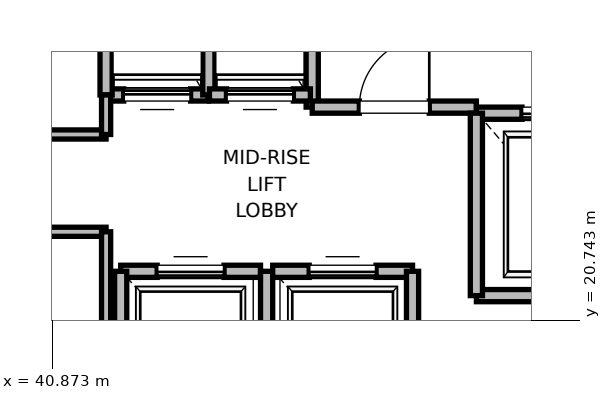
"""IFC4 building model, lengths in metres.
Left out: names, types, materials, properties, quantities, classifications, styles, units other than length and angle.
Written with IfcOpenShell. Run it as: python <this file> out.ifc"""

import sys

from ifc_helpers import new_model, si_unit, direction, frame, frame_2d, origin, place, context, subcontext, project, spatial, rectangle, extrude, element, fill, save


model = new_model("IFC4")
c1 = context("Model", 3, precision=1e-05, world=origin(), true_north=direction((0.0, 1.0)))
c2 = subcontext(c1, "Body", "Model", "MODEL_VIEW")
j1 = project(units=[si_unit("LENGTHUNIT", "METRE"), si_unit("PLANEANGLEUNIT", "RADIAN")], contexts=[c1])
p1 = place(None, origin())
s1 = spatial("IfcSite", under=j1, at=p1, CompositionType="ELEMENT")
p2 = place(p1, origin())
s2 = spatial("IfcBuilding", under=s1, at=p2, CompositionType="ELEMENT")
p3 = place(p2, frame((0.0, 0.0, 148.4)))
s3 = spatial("IfcBuildingStorey", under=s2, at=p3, CompositionType="ELEMENT", Elevation=148.4)
p4 = place(p3, frame((45.15, 24.25, 0.0), z_axis=(0.0, 0.0, 1.0), x_axis=(0.0, 1.0, 0.0)))
e1 = element("IfcWall", 1, at=p4, inside=s3, PredefinedType="PARTITIONING", context=c2, shape_type="SweptSolid", body=[
    extrude(rectangle(XDim=3.37, YDim=0.2, at=frame_2d((1.685, 0.0))), origin(), (0.0, 0.0, 1.0), 3.775),
])
p5 = place(p3, frame((45.15, 24.25, 0.0), z_axis=(0.0, 0.0, 1.0), x_axis=(1.0, 0.0, 0.0)))
e2 = element("IfcWall", 2, at=p5, inside=s3, PredefinedType="PARTITIONING", context=c2, shape_type="SweptSolid", body=[
    extrude(rectangle(XDim=2.7, YDim=0.2, at=frame_2d((1.35, 0.0))), origin(), (0.0, 0.0, 1.0), 3.775),
])
p6 = place(p5, frame((0.775, 0.0, 0.0)))
e3 = element("IfcOpeningElement", 3, at=p6, cuts=e2, PredefinedType="OPENING", context=c2, shape_type="SweptSolid", body=[
    extrude(rectangle(XDim=1.15, YDim=2.2, at=frame_2d((0.575, 1.1))), frame((0.0, 0.1, 0.0), z_axis=(0.0, -1.0, 0.0), x_axis=(1.0, 0.0, 0.0)), (0.0, 0.0, 1.0), 0.2),
])
p7 = place(p3, frame((47.85, 21.15, 0.0), z_axis=(0.0, 0.0, 1.0), x_axis=(1.0, 0.0, 0.0)))
e4 = element("IfcWall", 4, at=p7, inside=s3, PredefinedType="SOLIDWALL", context=c2, shape_type="SweptSolid", body=[
    extrude(rectangle(XDim=2.6, YDim=0.2, at=frame_2d((1.3, 0.0))), origin(), (0.0, 0.0, 1.0), 3.775),
])
p8 = place(p3, frame((50.45, 24.15, 0.0), z_axis=(0.0, 0.0, 1.0), x_axis=(-1.0, 0.0, 0.0)))
e5 = element("IfcWall", 5, at=p8, inside=s3, PredefinedType="SOLIDWALL", context=c2, shape_type="SweptSolid", body=[
    extrude(rectangle(XDim=2.6, YDim=0.2, at=frame_2d((1.3, 0.0))), origin(), (0.0, 0.0, 1.0), 2.755),
])
p9 = place(p8, frame((0.75, 0.0, 0.0)))
e6 = element("IfcOpeningElement", 6, at=p9, cuts=e5, PredefinedType="OPENING", context=c2, shape_type="SweptSolid", body=[
    extrude(rectangle(XDim=1.1, YDim=2.2, at=frame_2d((0.55, 1.1))), frame((0.0, 0.1, 0.0), z_axis=(0.0, -1.0, 0.0), x_axis=(1.0, 0.0, 0.0)), (0.0, 0.0, 1.0), 0.2),
])
p10 = place(p3, frame((47.85, 24.15, 0.0), z_axis=(0.0, 0.0, 1.0), x_axis=(0.0, -1.0, 0.0)))
e7 = element("IfcWall", 7, at=p10, inside=s3, PredefinedType="SOLIDWALL", context=c2, shape_type="SweptSolid", body=[
    extrude(rectangle(XDim=3.0, YDim=0.2, at=frame_2d((1.5, 0.0))), origin(), (0.0, 0.0, 1.0), 3.775),
])
p11 = place(p3, frame((44.3, 21.55, 0.0), z_axis=(0.0, 0.0, 1.0), x_axis=(-1.0, 0.0, 0.0)))
e8 = element("IfcWall", 8, at=p11, inside=s3, PredefinedType="SOLIDWALL", context=c2, shape_type="SweptSolid", body=[
    extrude(rectangle(XDim=2.3, YDim=0.2, at=frame_2d((1.15, 0.0))), origin(), (0.0, 0.0, 1.0), 3.775),
])
p12 = place(p11, frame((0.6, 0.0, 0.0)))
e9 = element("IfcOpeningElement", 9, at=p12, cuts=e8, PredefinedType="OPENING", context=c2, shape_type="SweptSolid", body=[
    extrude(rectangle(XDim=1.1, YDim=2.2, at=frame_2d((0.55, 1.1))), frame((0.0, 0.1, 0.0), z_axis=(0.0, -1.0, 0.0), x_axis=(1.0, 0.0, 0.0)), (0.0, 0.0, 1.0), 0.2),
])
p13 = place(p3, frame((42.0, 21.55, 0.0), z_axis=(0.0, 0.0, 1.0), x_axis=(0.0, -1.0, 0.0)))
e10 = element("IfcWall", 10, at=p13, inside=s3, PredefinedType="SOLIDWALL", context=c2, shape_type="SweptSolid", body=[
    extrude(rectangle(XDim=2.6, YDim=0.2, at=frame_2d((1.3, 0.0))), origin(), (0.0, 0.0, 1.0), 2.755),
])
p14 = place(p3, frame((44.4, 18.95, 0.0), z_axis=(0.0, 0.0, 1.0), x_axis=(0.0, 1.0, 0.0)))
e11 = element("IfcWall", 11, at=p14, inside=s3, PredefinedType="SOLIDWALL", context=c2, shape_type="SweptSolid", body=[
    extrude(rectangle(XDim=2.6, YDim=0.2, at=frame_2d((1.3, 0.0))), origin(), (0.0, 0.0, 1.0), 3.775),
])
p15 = place(p3, frame((46.8, 21.55, 0.0), z_axis=(0.0, 0.0, 1.0), x_axis=(-1.0, 0.0, 0.0)))
e12 = element("IfcWall", 12, at=p15, inside=s3, PredefinedType="SOLIDWALL", context=c2, shape_type="SweptSolid", body=[
    extrude(rectangle(XDim=2.3, YDim=0.2, at=frame_2d((1.15, 0.0))), origin(), (0.0, 0.0, 1.0), 3.775),
])
p16 = place(p15, frame((0.6, 0.0, 0.0)))
e13 = element("IfcOpeningElement", 13, at=p16, cuts=e12, PredefinedType="OPENING", context=c2, shape_type="SweptSolid", body=[
    extrude(rectangle(XDim=1.1, YDim=2.2, at=frame_2d((0.55, 1.1))), frame((0.0, 0.1, 0.0), z_axis=(0.0, -1.0, 0.0), x_axis=(1.0, 0.0, 0.0)), (0.0, 0.0, 1.0), 0.2),
])
p17 = place(p3, frame((46.8, 18.95, 0.0), z_axis=(0.0, 0.0, 1.0), x_axis=(0.0, 1.0, 0.0)))
e14 = element("IfcWall", 14, at=p17, inside=s3, PredefinedType="SOLIDWALL", context=c2, shape_type="SweptSolid", body=[
    extrude(rectangle(XDim=2.6, YDim=0.2, at=frame_2d((1.3, 0.0))), origin(), (0.0, 0.0, 1.0), 3.775),
])
p18 = place(p3, frame((41.76, 24.45, 0.0), z_axis=(0.0, 0.0, 1.0), x_axis=(1.0, 0.0, 0.0)))
e15 = element("IfcWall", 15, at=p18, inside=s3, PredefinedType="SOLIDWALL", context=c2, shape_type="SweptSolid", body=[
    extrude(rectangle(XDim=1.68, YDim=0.2, at=frame_2d((0.84, 0.0))), origin(), (0.0, 0.0, 1.0), 3.775),
])
p19 = place(p18, frame((0.29, 0.0, 0.0)))
e16 = element("IfcOpeningElement", 16, at=p19, cuts=e15, PredefinedType="OPENING", context=c2, shape_type="SweptSolid", body=[
    extrude(rectangle(XDim=1.1, YDim=2.2, at=frame_2d((0.55, 1.1))), frame((0.0, 0.1, 0.0), z_axis=(0.0, -1.0, 0.0), x_axis=(1.0, 0.0, 0.0)), (0.0, 0.0, 1.0), 0.2),
])
for number, where, z_axis, x_axis in (
    (17, (41.76, 27.05, 0.0), (0.0, 0.0, 1.0), (0.0, -1.0, 0.0)),
    (18, (43.45, 24.45, 0.0), (0.0, 0.0, 1.0), (0.0, 1.0, 0.0)),
):
    element("IfcWall", number, at=place(p3, frame(where, z_axis=z_axis, x_axis=x_axis)), inside=s3, PredefinedType="SOLIDWALL", context=c2, shape_type="SweptSolid", body=[
        extrude(rectangle(XDim=2.6, YDim=0.2, at=frame_2d((1.3, 0.0))), origin(), (0.0, 0.0, 1.0), 3.775),
    ])
p20 = place(p3, frame((43.46, 24.45, 0.0), z_axis=(0.0, 0.0, 1.0), x_axis=(1.0, 0.0, 0.0)))
e19 = element("IfcWall", 19, at=p20, inside=s3, PredefinedType="SOLIDWALL", context=c2, shape_type="SweptSolid", body=[
    extrude(rectangle(XDim=1.66, YDim=0.2, at=frame_2d((0.83, 0.0))), origin(), (0.0, 0.0, 1.0), 3.775),
])
p21 = place(p20, frame((0.28, 0.0, 0.0)))
e20 = element("IfcOpeningElement", 20, at=p21, cuts=e19, PredefinedType="OPENING", context=c2, shape_type="SweptSolid", body=[
    extrude(rectangle(XDim=1.1, YDim=2.2, at=frame_2d((0.55, 1.1))), frame((0.0, 0.1, 0.0), z_axis=(0.0, -1.0, 0.0), x_axis=(1.0, 0.0, 0.0)), (0.0, 0.0, 1.0), 0.2),
])
for number, where, z_axis, x_axis in (
    (21, (39.95, 22.2, 0.0), (0.0, 0.0, 1.0), (1.0, 0.0, 0.0)),
    (22, (39.95, 23.8, 0.0), (0.0, 0.0, 1.0), (1.0, 0.0, 0.0)),
):
    element("IfcWall", number, at=place(p3, frame(where, z_axis=z_axis, x_axis=x_axis)), inside=s3, PredefinedType="PARTITIONING", context=c2, shape_type="SweptSolid", body=[
        extrude(rectangle(XDim=1.81, YDim=0.15, at=frame_2d((0.905, 0.0))), origin(), (0.0, 0.0, 1.0), 2.85),
    ])
p22 = place(p3, frame((41.76, 18.6, 0.0), z_axis=(0.0, 0.0, 1.0), x_axis=(0.0, 1.0, 0.0)))
e23 = element("IfcWall", 23, at=p22, inside=s3, PredefinedType="PARTITIONING", context=c2, shape_type="SweptSolid", body=[
    extrude(rectangle(XDim=3.6, YDim=0.15, at=frame_2d((1.8, 0.0))), origin(), (0.0, 0.0, 1.0), 2.755),
])
p23 = place(p3, frame((41.76, 23.8, 0.0), z_axis=(0.0, 0.0, 1.0), x_axis=(0.0, 1.0, 0.0)))
e24 = element("IfcWall", 24, at=p23, inside=s3, PredefinedType="PARTITIONING", context=c2, shape_type="SweptSolid", body=[
    extrude(rectangle(XDim=0.65, YDim=0.15, at=frame_2d((0.325, 0.0))), origin(), (0.0, 0.0, 1.0), 2.85),
])
p24 = place(p6, origin())
e25 = element("IfcDoor", 25, at=p24, inside=s3, OperationType="SINGLE_SWING_RIGHT", PredefinedType="DOOR", context=c2, shape_type="SweptSolid", body=[
    extrude(rectangle(XDim=1.15, YDim=2.2, at=frame_2d((0.575, 1.1))), frame((0.0, 0.025, 0.0), z_axis=(0.0, -1.0, 0.0), x_axis=(1.0, 0.0, 0.0)), (0.0, 0.0, 1.0), 0.05),
])
fill(e3, e25)
p25 = place(p9, origin())
e26 = element("IfcDoor", 26, at=p25, inside=s3, OperationType="SLIDING_TO_RIGHT", PredefinedType="DOOR", context=c2, shape_type="SweptSolid", body=[
    extrude(rectangle(XDim=1.1, YDim=2.2, at=frame_2d((0.55, 1.1))), frame((0.0, 0.025, 0.0), z_axis=(0.0, -1.0, 0.0), x_axis=(1.0, 0.0, 0.0)), (0.0, 0.0, 1.0), 0.05),
])
fill(e6, e26)
p26 = place(p12, origin())
e27 = element("IfcDoor", 27, at=p26, inside=s3, OperationType="SLIDING_TO_RIGHT", PredefinedType="DOOR", context=c2, shape_type="SweptSolid", body=[
    extrude(rectangle(XDim=1.1, YDim=2.2, at=frame_2d((0.55, 1.1))), frame((0.0, 0.025, 0.0), z_axis=(0.0, -1.0, 0.0), x_axis=(1.0, 0.0, 0.0)), (0.0, 0.0, 1.0), 0.05),
])
fill(e9, e27)
p27 = place(p16, origin())
e28 = element("IfcDoor", 28, at=p27, inside=s3, OperationType="SLIDING_TO_RIGHT", PredefinedType="DOOR", context=c2, shape_type="SweptSolid", body=[
    extrude(rectangle(XDim=1.1, YDim=2.2, at=frame_2d((0.55, 1.1))), frame((0.0, 0.025, 0.0), z_axis=(0.0, -1.0, 0.0), x_axis=(1.0, 0.0, 0.0)), (0.0, 0.0, 1.0), 0.05),
])
fill(e13, e28)
p28 = place(p19, origin())
e29 = element("IfcDoor", 29, at=p28, inside=s3, OperationType="SLIDING_TO_RIGHT", PredefinedType="DOOR", context=c2, shape_type="SweptSolid", body=[
    extrude(rectangle(XDim=1.1, YDim=2.2, at=frame_2d((0.55, 1.1))), frame((0.0, 0.025, 0.0), z_axis=(0.0, -1.0, 0.0), x_axis=(1.0, 0.0, 0.0)), (0.0, 0.0, 1.0), 0.05),
])
fill(e16, e29)
p29 = place(p21, origin())
e30 = element("IfcDoor", 30, at=p29, inside=s3, OperationType="SLIDING_TO_RIGHT", PredefinedType="DOOR", context=c2, shape_type="SweptSolid", body=[
    extrude(rectangle(XDim=1.1, YDim=2.2, at=frame_2d((0.55, 1.1))), frame((0.0, 0.025, 0.0), z_axis=(0.0, -1.0, 0.0), x_axis=(1.0, 0.0, 0.0)), (0.0, 0.0, 1.0), 0.05),
])
fill(e20, e30)
save(model, sys.argv[1])
